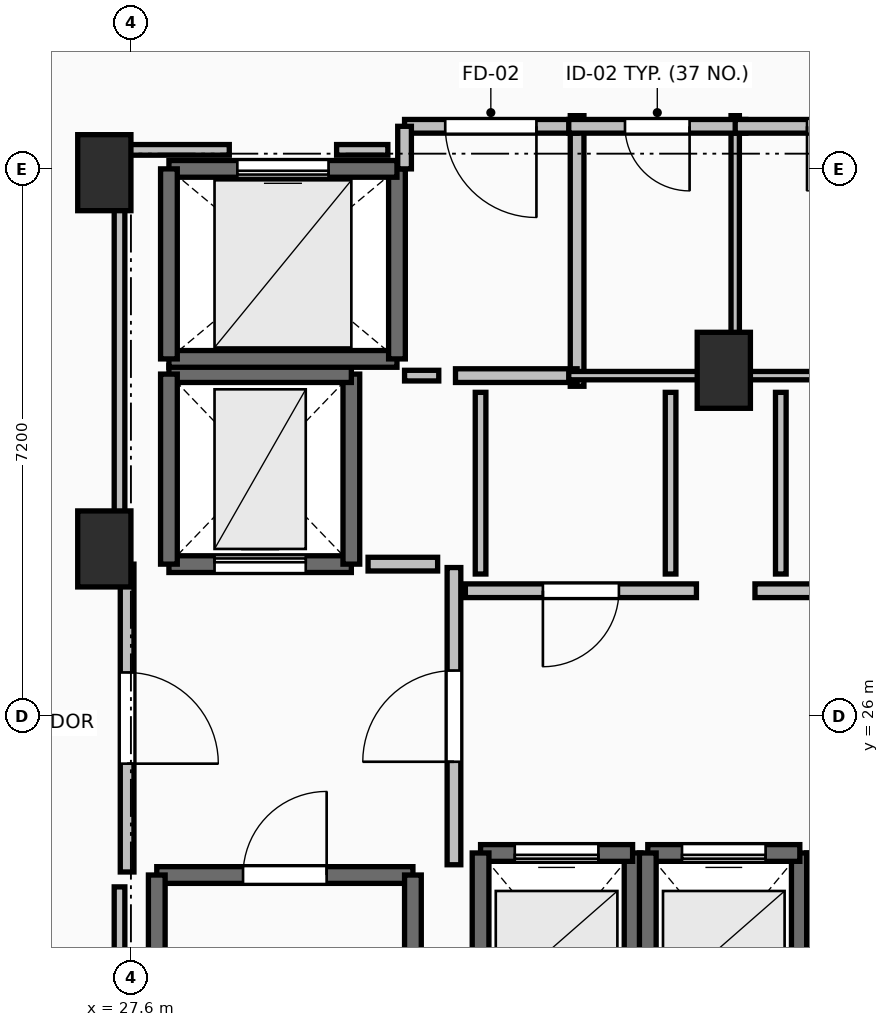
"""IFC4 building model, lengths in metres.
Left out: names, types, materials, properties, quantities, classifications, styles, units other than length and angle.
Written with IfcOpenShell. Run it as: python <this file> out.ifc"""

import sys

from ifc_helpers import new_model, si_unit, direction, frame, frame_2d, origin, origin_2d, place, context, subcontext, project, spatial, rectangle, extrude, element, fill, save


model = new_model("IFC4")
c1 = context("Model", 3, precision=1e-05, world=origin(), true_north=direction((0.0, 1.0)))
c2 = subcontext(c1, "Body", "Model", "MODEL_VIEW")
j1 = project(units=[si_unit("LENGTHUNIT", "METRE"), si_unit("PLANEANGLEUNIT", "RADIAN")], contexts=[c1])
p1 = place(None, origin())
s1 = spatial("IfcSite", under=j1, at=p1, CompositionType="ELEMENT")
p2 = place(p1, origin())
s2 = spatial("IfcBuilding", under=s1, at=p2, CompositionType="ELEMENT")
p3 = place(p2, frame((0.0, 0.0, 186.1)))
s3 = spatial("IfcBuildingStorey", under=s2, at=p3, CompositionType="ELEMENT", Elevation=186.1)
for number, where, z_axis, x_axis in (
    (1, (27.25, 28.2, 0.0), (0.0, 0.0, 1.0), (1.0, 0.0, 0.0)),
    (2, (27.25, 33.15, 0.0), (0.0, 0.0, 1.0), (1.0, 0.0, 0.0)),
    (3, (35.4, 30.55, 0.0), (0.0, 0.0, 1.0), (1.0, 0.0, 0.0)),
):
    element("IfcColumn", number, at=place(p3, frame(where, z_axis=z_axis, x_axis=x_axis)), inside=s3, PredefinedType="PILASTER", context=c2, shape_type="SweptSolid", body=[
        extrude(rectangle(XDim=0.7, YDim=1.0, at=origin_2d()), origin(), (0.0, 0.0, 1.0), 3.5),
    ])
p4 = place(p3, frame((27.94, 23.91, 0.0), z_axis=(0.0, 0.0, 1.0), x_axis=(1.0, 0.0, 0.0)))
e4 = element("IfcWall", 4, at=p4, inside=s3, PredefinedType="SOLIDWALL", context=c2, shape_type="SweptSolid", body=[
    extrude(rectangle(XDim=3.37, YDim=0.22, at=frame_2d((1.685, 0.0))), origin(), (0.0, 0.0, 1.0), 3.24),
])
p5 = place(p4, frame((1.135, 0.0, 0.0)))
e5 = element("IfcOpeningElement", 5, at=p5, cuts=e4, PredefinedType="OPENING", context=c2, shape_type="SweptSolid", body=[
    extrude(rectangle(XDim=1.1, YDim=2.15, at=frame_2d((0.55, 1.075))), frame((0.0, 0.125, 0.0), z_axis=(0.0, -1.0, 0.0), x_axis=(1.0, 0.0, 0.0)), (0.0, 0.0, 1.0), 0.25),
])
for number, where, z_axis, x_axis in (
    (6, (31.31, 23.91, 0.0), (0.0, 0.0, 1.0), (0.0, -1.0, 0.0)),
    (7, (27.94, 16.49, 0.0), (0.0, 0.0, 1.0), (0.0, 1.0, 0.0)),
):
    element("IfcWall", number, at=place(p3, frame(where, z_axis=z_axis, x_axis=x_axis)), inside=s3, PredefinedType="SOLIDWALL", context=c2, shape_type="SweptSolid", body=[
        extrude(rectangle(XDim=7.42, YDim=0.22, at=frame_2d((3.71, 0.0))), origin(), (0.0, 0.0, 1.0), 3.24),
    ])
p6 = place(p3, frame((34.2, 21.8, 0.0), z_axis=(0.0, 0.0, 1.0), x_axis=(0.0, 1.0, 0.0)))
e8 = element("IfcWall", 8, at=p6, inside=s3, PredefinedType="SOLIDWALL", context=c2, shape_type="SweptSolid", body=[
    extrude(rectangle(XDim=2.4, YDim=0.22, at=frame_2d((1.2, 0.0))), origin(), (0.0, 0.0, 1.0), 3.24),
])
p7 = place(p3, frame((34.2, 24.2, 0.0), z_axis=(0.0, 0.0, 1.0), x_axis=(-1.0, 0.0, 0.0)))
e9 = element("IfcWall", 9, at=p7, inside=s3, PredefinedType="SOLIDWALL", context=c2, shape_type="SweptSolid", body=[
    extrude(rectangle(XDim=2.0, YDim=0.22, at=frame_2d((1.0, 0.0))), origin(), (0.0, 0.0, 1.0), 3.24),
])
p8 = place(p7, frame((0.45, 0.0, 0.0)))
e10 = element("IfcOpeningElement", 10, at=p8, cuts=e9, PredefinedType="OPENING", context=c2, shape_type="SweptSolid", body=[
    extrude(rectangle(XDim=1.1, YDim=2.2, at=frame_2d((0.55, 1.1))), frame((0.0, 0.125, 0.0), z_axis=(0.0, -1.0, 0.0), x_axis=(1.0, 0.0, 0.0)), (0.0, 0.0, 1.0), 0.25),
])
for number, where, z_axis, x_axis in (
    (11, (32.2, 24.2, 0.0), (0.0, 0.0, 1.0), (0.0, -1.0, 0.0)),
    (12, (36.4, 21.8, 0.0), (0.0, 0.0, 1.0), (0.0, 1.0, 0.0)),
):
    element("IfcWall", number, at=place(p3, frame(where, z_axis=z_axis, x_axis=x_axis)), inside=s3, PredefinedType="SOLIDWALL", context=c2, shape_type="SweptSolid", body=[
        extrude(rectangle(XDim=2.4, YDim=0.22, at=frame_2d((1.2, 0.0))), origin(), (0.0, 0.0, 1.0), 3.24),
    ])
p9 = place(p3, frame((36.4, 24.2, 0.0), z_axis=(0.0, 0.0, 1.0), x_axis=(-1.0, 0.0, 0.0)))
e13 = element("IfcWall", 13, at=p9, inside=s3, PredefinedType="SOLIDWALL", context=c2, shape_type="SweptSolid", body=[
    extrude(rectangle(XDim=2.0, YDim=0.22, at=frame_2d((1.0, 0.0))), origin(), (0.0, 0.0, 1.0), 3.24),
])
p10 = place(p9, frame((0.45, 0.0, 0.0)))
e14 = element("IfcOpeningElement", 14, at=p10, cuts=e13, PredefinedType="OPENING", context=c2, shape_type="SweptSolid", body=[
    extrude(rectangle(XDim=1.1, YDim=2.2, at=frame_2d((0.55, 1.1))), frame((0.0, 0.125, 0.0), z_axis=(0.0, -1.0, 0.0), x_axis=(1.0, 0.0, 0.0)), (0.0, 0.0, 1.0), 0.25),
])
p11 = place(p3, frame((34.4, 24.2, 0.0), z_axis=(0.0, 0.0, 1.0), x_axis=(0.0, -1.0, 0.0)))
e15 = element("IfcWall", 15, at=p11, inside=s3, PredefinedType="SOLIDWALL", context=c2, shape_type="SweptSolid", body=[
    extrude(rectangle(XDim=2.4, YDim=0.22, at=frame_2d((1.2, 0.0))), origin(), (0.0, 0.0, 1.0), 3.24),
])
p12 = place(p3, frame((36.6, 24.2, 0.0), z_axis=(0.0, 0.0, 1.0), x_axis=(0.0, -1.0, 0.0)))
e16 = element("IfcWall", 16, at=p12, inside=s3, PredefinedType="SOLIDWALL", context=c2, shape_type="SweptSolid", body=[
    extrude(rectangle(XDim=2.6, YDim=0.22, at=frame_2d((1.3, 0.0))), origin(), (0.0, 0.0, 1.0), 3.24),
])
p13 = place(p3, frame((28.1, 28.0, 0.0), z_axis=(0.0, 0.0, 1.0), x_axis=(1.0, 0.0, 0.0)))
e17 = element("IfcWall", 17, at=p13, inside=s3, PredefinedType="SHEAR", context=c2, shape_type="SweptSolid", body=[
    extrude(rectangle(XDim=2.4, YDim=0.22, at=frame_2d((1.2, 0.0))), origin(), (0.0, 0.0, 1.0), 3.24),
])
p14 = place(p13, frame((0.6, 0.0, 0.0)))
e18 = element("IfcOpeningElement", 18, at=p14, cuts=e17, PredefinedType="OPENING", context=c2, shape_type="SweptSolid", body=[
    extrude(rectangle(XDim=1.2, YDim=2.2, at=frame_2d((0.6, 1.1))), frame((0.0, 0.125, 0.0), z_axis=(0.0, -1.0, 0.0), x_axis=(1.0, 0.0, 0.0)), (0.0, 0.0, 1.0), 0.25),
])
p15 = place(p3, frame((30.5, 28.0, 0.0), z_axis=(0.0, 0.0, 1.0), x_axis=(0.0, 1.0, 0.0)))
e19 = element("IfcWall", 19, at=p15, inside=s3, PredefinedType="SHEAR", context=c2, shape_type="SweptSolid", body=[
    extrude(rectangle(XDim=2.5, YDim=0.22, at=frame_2d((1.25, 0.0))), origin(), (0.0, 0.0, 1.0), 3.24),
])
p16 = place(p3, frame((30.5, 30.5, 0.0), z_axis=(0.0, 0.0, 1.0), x_axis=(-1.0, 0.0, 0.0)))
e20 = element("IfcWall", 20, at=p16, inside=s3, PredefinedType="SHEAR", context=c2, shape_type="SweptSolid", body=[
    extrude(rectangle(XDim=2.4, YDim=0.22, at=frame_2d((1.2, 0.0))), origin(), (0.0, 0.0, 1.0), 3.24),
])
p17 = place(p3, frame((28.1, 30.5, 0.0), z_axis=(0.0, 0.0, 1.0), x_axis=(0.0, -1.0, 0.0)))
e21 = element("IfcWall", 21, at=p17, inside=s3, PredefinedType="SHEAR", context=c2, shape_type="SweptSolid", body=[
    extrude(rectangle(XDim=2.5, YDim=0.22, at=frame_2d((1.25, 0.0))), origin(), (0.0, 0.0, 1.0), 3.24),
])
p18 = place(p3, frame((28.1, 30.7, 0.0), z_axis=(0.0, 0.0, 1.0), x_axis=(1.0, 0.0, 0.0)))
e22 = element("IfcWall", 22, at=p18, inside=s3, PredefinedType="SOLIDWALL", context=c2, shape_type="SweptSolid", body=[
    extrude(rectangle(XDim=3.0, YDim=0.22, at=frame_2d((1.5, 0.0))), origin(), (0.0, 0.0, 1.0), 3.24),
])
p19 = place(p3, frame((31.1, 30.7, 0.0), z_axis=(0.0, 0.0, 1.0), x_axis=(0.0, 1.0, 0.0)))
e23 = element("IfcWall", 23, at=p19, inside=s3, PredefinedType="SOLIDWALL", context=c2, shape_type="SweptSolid", body=[
    extrude(rectangle(XDim=2.5, YDim=0.22, at=frame_2d((1.25, 0.0))), origin(), (0.0, 0.0, 1.0), 3.24),
])
p20 = place(p3, frame((31.1, 33.2, 0.0), z_axis=(0.0, 0.0, 1.0), x_axis=(-1.0, 0.0, 0.0)))
e24 = element("IfcWall", 24, at=p20, inside=s3, PredefinedType="SOLIDWALL", context=c2, shape_type="SweptSolid", body=[
    extrude(rectangle(XDim=3.0, YDim=0.22, at=frame_2d((1.5, 0.0))), origin(), (0.0, 0.0, 1.0), 3.24),
])
p21 = place(p20, frame((0.9, 0.0, 0.0)))
e25 = element("IfcOpeningElement", 25, at=p21, cuts=e24, PredefinedType="OPENING", context=c2, shape_type="SweptSolid", body=[
    extrude(rectangle(XDim=1.2, YDim=2.2, at=frame_2d((0.6, 1.1))), frame((0.0, 0.125, 0.0), z_axis=(0.0, -1.0, 0.0), x_axis=(1.0, 0.0, 0.0)), (0.0, 0.0, 1.0), 0.25),
])
p22 = place(p3, frame((28.1, 33.2, 0.0), z_axis=(0.0, 0.0, 1.0), x_axis=(0.0, -1.0, 0.0)))
e26 = element("IfcWall", 26, at=p22, inside=s3, PredefinedType="SOLIDWALL", context=c2, shape_type="SweptSolid", body=[
    extrude(rectangle(XDim=2.5, YDim=0.22, at=frame_2d((1.25, 0.0))), origin(), (0.0, 0.0, 1.0), 3.24),
])
p23 = place(p3, frame((31.85, 24.045, 0.0), z_axis=(0.0, 0.0, 1.0), x_axis=(0.0, 1.0, 0.0)))
e27 = element("IfcWall", 27, at=p23, inside=s3, PredefinedType="PARTITIONING", context=c2, shape_type="SweptSolid", body=[
    extrude(rectangle(XDim=3.91, YDim=0.18, at=frame_2d((1.955, 0.0))), origin(), (0.0, 0.0, 1.0), 3.24),
])
p24 = place(p23, frame((1.355, 0.0, 0.0)))
e28 = element("IfcOpeningElement", 28, at=p24, cuts=e27, PredefinedType="OPENING", context=c2, shape_type="SweptSolid", body=[
    extrude(rectangle(XDim=1.2, YDim=2.15, at=frame_2d((0.6, 1.075))), frame((0.0, 0.105, 0.0), z_axis=(0.0, -1.0, 0.0), x_axis=(1.0, 0.0, 0.0)), (0.0, 0.0, 1.0), 0.21),
])
p25 = place(p3, frame((27.55, 28.0, 0.0), z_axis=(0.0, 0.0, 1.0), x_axis=(0.0, -1.0, 0.0)))
e29 = element("IfcWall", 29, at=p25, inside=s3, PredefinedType="PARTITIONING", context=c2, shape_type="SweptSolid", body=[
    extrude(rectangle(XDim=4.05, YDim=0.18, at=frame_2d((2.025, 0.0))), origin(), (0.0, 0.0, 1.0), 3.24),
])
p26 = place(p25, frame((1.425, 0.0, 0.0)))
e30 = element("IfcOpeningElement", 30, at=p26, cuts=e29, PredefinedType="OPENING", context=c2, shape_type="SweptSolid", body=[
    extrude(rectangle(XDim=1.2, YDim=2.15, at=frame_2d((0.6, 1.075))), frame((0.0, 0.105, 0.0), z_axis=(0.0, -1.0, 0.0), x_axis=(1.0, 0.0, 0.0)), (0.0, 0.0, 1.0), 0.21),
])
p27 = place(p3, frame((33.47, 30.34, 0.0), z_axis=(0.0, 0.0, 1.0), x_axis=(0.0, 1.0, 0.0)))
e31 = element("IfcWall", 31, at=p27, inside=s3, PredefinedType="PARTITIONING", context=c2, shape_type="SweptSolid", body=[
    extrude(rectangle(XDim=3.56, YDim=0.18, at=frame_2d((1.78, 0.0))), origin(), (0.0, 0.0, 1.0), 3.24),
])
p28 = place(p3, frame((31.87, 30.48, 0.0), z_axis=(0.0, 0.0, 1.0), x_axis=(1.0, 0.0, 0.0)))
e32 = element("IfcWall", 32, at=p28, inside=s3, PredefinedType="PARTITIONING", context=c2, shape_type="SweptSolid", body=[
    extrude(rectangle(XDim=1.6, YDim=0.18, at=frame_2d((0.8, 0.0))), origin(), (0.0, 0.0, 1.0), 3.24),
])
p29 = place(p3, frame((33.47, 33.76, 0.0), z_axis=(0.0, 0.0, 1.0), x_axis=(-1.0, 0.0, 0.0)))
e33 = element("IfcWall", 33, at=p29, inside=s3, PredefinedType="PARTITIONING", context=c2, shape_type="SweptSolid", body=[
    extrude(rectangle(XDim=2.27, YDim=0.18, at=frame_2d((1.135, 0.0))), origin(), (0.0, 0.0, 1.0), 3.24),
])
p30 = place(p29, frame((0.535, 0.0, 0.0)))
e34 = element("IfcOpeningElement", 34, at=p30, cuts=e33, PredefinedType="OPENING", context=c2, shape_type="SweptSolid", body=[
    extrude(rectangle(XDim=1.2, YDim=2.15, at=frame_2d((0.6, 1.075))), frame((0.0, 0.105, 0.0), z_axis=(0.0, -1.0, 0.0), x_axis=(1.0, 0.0, 0.0)), (0.0, 0.0, 1.0), 0.21),
])
p31 = place(p3, frame((31.2, 33.76, 0.0), z_axis=(0.0, 0.0, 1.0), x_axis=(0.0, -1.0, 0.0)))
e35 = element("IfcWall", 35, at=p31, inside=s3, PredefinedType="PARTITIONING", context=c2, shape_type="SweptSolid", body=[
    extrude(rectangle(XDim=0.56, YDim=0.18, at=frame_2d((0.28, 0.0))), origin(), (0.0, 0.0, 1.0), 3.24),
])
p32 = place(p3, frame((35.04, 27.65, 0.0), z_axis=(0.0, 0.0, 1.0), x_axis=(-1.0, 0.0, 0.0)))
e36 = element("IfcWall", 36, at=p32, inside=s3, PredefinedType="PARTITIONING", context=c2, shape_type="SweptSolid", body=[
    extrude(rectangle(XDim=3.04, YDim=0.18, at=frame_2d((1.52, 0.0))), origin(), (0.0, 0.0, 1.0), 3.24),
])
p33 = place(p32, frame((1.02, 0.0, 0.0)))
e37 = element("IfcOpeningElement", 37, at=p33, cuts=e36, PredefinedType="OPENING", context=c2, shape_type="SweptSolid", body=[
    extrude(rectangle(XDim=1.0, YDim=2.15, at=frame_2d((0.5, 1.075))), frame((0.0, 0.105, 0.0), z_axis=(0.0, -1.0, 0.0), x_axis=(1.0, 0.0, 0.0)), (0.0, 0.0, 1.0), 0.21),
])
p34 = place(p3, frame((39.19, 27.65, 0.0), z_axis=(0.0, 0.0, 1.0), x_axis=(-1.0, 0.0, 0.0)))
e38 = element("IfcWall", 38, at=p34, inside=s3, PredefinedType="PARTITIONING", context=c2, shape_type="SweptSolid", body=[
    extrude(rectangle(XDim=3.38, YDim=0.18, at=frame_2d((1.69, 0.0))), origin(), (0.0, 0.0, 1.0), 3.24),
])
p35 = place(p34, frame((1.265, 0.0, 0.0)))
e39 = element("IfcOpeningElement", 39, at=p35, cuts=e38, PredefinedType="OPENING", context=c2, shape_type="SweptSolid", body=[
    extrude(rectangle(XDim=0.85, YDim=2.1, at=frame_2d((0.425, 1.05))), frame((0.0, 0.105, 0.0), z_axis=(0.0, -1.0, 0.0), x_axis=(1.0, 0.0, 0.0)), (0.0, 0.0, 1.0), 0.21),
])
p36 = place(p3, frame((35.55, 30.34, 0.0), z_axis=(0.0, 0.0, 1.0), x_axis=(0.0, 1.0, 0.0)))
e40 = element("IfcWall", 40, at=p36, inside=s3, PredefinedType="PARTITIONING", context=c2, shape_type="SweptSolid", body=[
    extrude(rectangle(XDim=3.56, YDim=0.11, at=frame_2d((1.78, 0.0))), origin(), (0.0, 0.0, 1.0), 2.432),
])
p37 = place(p3, frame((33.36, 30.48, 0.0), z_axis=(0.0, 0.0, 1.0), x_axis=(1.0, 0.0, 0.0)))
e41 = element("IfcWall", 41, at=p37, inside=s3, PredefinedType="PARTITIONING", context=c2, shape_type="SweptSolid", body=[
    extrude(rectangle(XDim=1.81, YDim=0.11, at=frame_2d((0.905, 0.0))), origin(), (0.0, 0.0, 1.0), 3.24),
])
p38 = place(p3, frame((35.69, 33.76, 0.0), z_axis=(0.0, 0.0, 1.0), x_axis=(-1.0, 0.0, 0.0)))
e42 = element("IfcWall", 42, at=p38, inside=s3, PredefinedType="PARTITIONING", context=c2, shape_type="SweptSolid", body=[
    extrude(rectangle(XDim=2.33, YDim=0.18, at=frame_2d((1.165, 0.0))), origin(), (0.0, 0.0, 1.0), 3.24),
])
p39 = place(p38, frame((0.74, 0.0, 0.0)))
e43 = element("IfcOpeningElement", 43, at=p39, cuts=e42, PredefinedType="OPENING", context=c2, shape_type="SweptSolid", body=[
    extrude(rectangle(XDim=0.85, YDim=2.1, at=frame_2d((0.425, 1.05))), frame((0.0, 0.105, 0.0), z_axis=(0.0, -1.0, 0.0), x_axis=(1.0, 0.0, 0.0)), (0.0, 0.0, 1.0), 0.21),
])
p40 = place(p3, frame((35.68, 30.48, 0.0), z_axis=(0.0, 0.0, 1.0), x_axis=(1.0, 0.0, 0.0)))
e44 = element("IfcWall", 44, at=p40, inside=s3, PredefinedType="PARTITIONING", context=c2, shape_type="SweptSolid", body=[
    extrude(rectangle(XDim=2.595, YDim=0.11, at=frame_2d((1.297, 0.0))), origin(), (0.0, 0.0, 1.0), 2.432),
])
p41 = place(p3, frame((38.29, 33.76, 0.0), z_axis=(0.0, 0.0, 1.0), x_axis=(-1.0, 0.0, 0.0)))
e45 = element("IfcWall", 45, at=p41, inside=s3, PredefinedType="PARTITIONING", context=c2, shape_type="SweptSolid", body=[
    extrude(rectangle(XDim=2.74, YDim=0.18, at=frame_2d((1.37, 0.0))), origin(), (0.0, 0.0, 1.0), 3.24),
])
p42 = place(p41, frame((0.945, 0.0, 0.0)))
e46 = element("IfcOpeningElement", 46, at=p42, cuts=e45, PredefinedType="OPENING", context=c2, shape_type="SweptSolid", body=[
    extrude(rectangle(XDim=0.85, YDim=2.1, at=frame_2d((0.425, 1.05))), frame((0.0, 0.105, 0.0), z_axis=(0.0, -1.0, 0.0), x_axis=(1.0, 0.0, 0.0)), (0.0, 0.0, 1.0), 0.21),
])
p43 = place(p3, frame((31.635, 28.0, 0.0), z_axis=(0.0, 0.0, 1.0), x_axis=(-1.0, 0.0, 0.0)))
e47 = element("IfcWall", 47, at=p43, inside=s3, PredefinedType="PARTITIONING", context=c2, shape_type="SweptSolid", body=[
    extrude(rectangle(XDim=0.915, YDim=0.18, at=frame_2d((0.458, 0.0))), origin(), (0.0, 0.0, 1.0), 3.24),
])
p44 = place(p3, frame((31.2, 30.48, 0.0), z_axis=(0.0, 0.0, 1.0), x_axis=(1.0, 0.0, 0.0)))
e48 = element("IfcWall", 48, at=p44, inside=s3, PredefinedType="PARTITIONING", context=c2, shape_type="SweptSolid", body=[
    extrude(rectangle(XDim=0.45, YDim=0.14, at=frame_2d((0.225, 0.0))), origin(), (0.0, 0.0, 1.0), 3.24),
])
for number, where, z_axis, x_axis in (
    (49, (32.2, 30.26, 0.0), (0.0, 0.0, 1.0), (0.0, -1.0, 0.0)),
    (50, (34.7, 27.87, 0.0), (0.0, 0.0, 1.0), (0.0, 1.0, 0.0)),
    (51, (36.15, 30.26, 0.0), (0.0, 0.0, 1.0), (0.0, -1.0, 0.0)),
):
    element("IfcWall", number, at=place(p3, frame(where, z_axis=z_axis, x_axis=x_axis)), inside=s3, PredefinedType="PARTITIONING", context=c2, shape_type="SweptSolid", body=[
        extrude(rectangle(XDim=2.39, YDim=0.14, at=frame_2d((1.195, 0.0))), origin(), (0.0, 0.0, 1.0), 3.24),
    ])
p45 = place(p3, frame((30.98, 33.45, 0.0), z_axis=(0.0, 0.0, 1.0), x_axis=(-1.0, 0.0, 0.0)))
e52 = element("IfcWall", 52, at=p45, inside=s3, PredefinedType="PARTITIONING", context=c2, shape_type="SweptSolid", body=[
    extrude(rectangle(XDim=0.674, YDim=0.14, at=frame_2d((0.337, 0.0))), origin(), (0.0, 0.0, 1.0), 3.24),
])
p46 = place(p3, frame((28.894, 33.45, 0.0), z_axis=(0.0, 0.0, 1.0), x_axis=(-1.0, 0.0, 0.0)))
e53 = element("IfcWall", 53, at=p46, inside=s3, PredefinedType="PARTITIONING", context=c2, shape_type="SweptSolid", body=[
    extrude(rectangle(XDim=1.444, YDim=0.14, at=frame_2d((0.722, 0.0))), origin(), (0.0, 0.0, 1.0), 2.432),
])
p47 = place(p3, frame((27.45, 33.45, 0.0), z_axis=(0.0, 0.0, 1.0), x_axis=(0.0, -1.0, 0.0)))
e54 = element("IfcWall", 54, at=p47, inside=s3, PredefinedType="PARTITIONING", context=c2, shape_type="SweptSolid", body=[
    extrude(rectangle(XDim=5.254, YDim=0.14, at=frame_2d((2.627, 0.0))), origin(), (0.0, 0.0, 1.0), 2.432),
])
p48 = place(p3, frame((27.45, 23.754, 0.0), z_axis=(0.0, 0.0, 1.0), x_axis=(0.0, -1.0, 0.0)))
e55 = element("IfcWall", 55, at=p48, inside=s3, PredefinedType="PARTITIONING", context=c2, shape_type="SweptSolid", body=[
    extrude(rectangle(XDim=7.514, YDim=0.14, at=frame_2d((3.757, 0.0))), origin(), (0.0, 0.0, 1.0), 2.432),
])
p49 = place(p5, origin())
e56 = element("IfcDoor", 56, at=p49, inside=s3, OperationType="SINGLE_SWING_RIGHT", PredefinedType="DOOR", context=c2, shape_type="SweptSolid", body=[
    extrude(rectangle(XDim=1.1, YDim=2.15, at=frame_2d((0.55, 1.075))), frame((0.0, 0.025, 0.0), z_axis=(0.0, -1.0, 0.0), x_axis=(1.0, 0.0, 0.0)), (0.0, 0.0, 1.0), 0.05),
])
fill(e5, e56)
p50 = place(p8, origin())
e57 = element("IfcDoor", 57, at=p50, inside=s3, OperationType="SLIDING_TO_LEFT", PredefinedType="DOOR", context=c2, shape_type="SweptSolid", body=[
    extrude(rectangle(XDim=1.1, YDim=2.2, at=frame_2d((0.55, 1.1))), frame((0.0, 0.025, 0.0), z_axis=(0.0, -1.0, 0.0), x_axis=(1.0, 0.0, 0.0)), (0.0, 0.0, 1.0), 0.05),
])
fill(e10, e57)
p51 = place(p10, origin())
e58 = element("IfcDoor", 58, at=p51, inside=s3, OperationType="SLIDING_TO_LEFT", PredefinedType="DOOR", context=c2, shape_type="SweptSolid", body=[
    extrude(rectangle(XDim=1.1, YDim=2.2, at=frame_2d((0.55, 1.1))), frame((0.0, 0.025, 0.0), z_axis=(0.0, -1.0, 0.0), x_axis=(1.0, 0.0, 0.0)), (0.0, 0.0, 1.0), 0.05),
])
fill(e14, e58)
p52 = place(p14, origin())
e59 = element("IfcDoor", 59, at=p52, inside=s3, OperationType="SLIDING_TO_LEFT", PredefinedType="DOOR", context=c2, shape_type="SweptSolid", body=[
    extrude(rectangle(XDim=1.2, YDim=2.2, at=frame_2d((0.6, 1.1))), frame((0.0, 0.025, 0.0), z_axis=(0.0, -1.0, 0.0), x_axis=(1.0, 0.0, 0.0)), (0.0, 0.0, 1.0), 0.05),
])
fill(e18, e59)
p53 = place(p21, origin())
e60 = element("IfcDoor", 60, at=p53, inside=s3, OperationType="SLIDING_TO_LEFT", PredefinedType="DOOR", context=c2, shape_type="SweptSolid", body=[
    extrude(rectangle(XDim=1.2, YDim=2.2, at=frame_2d((0.6, 1.1))), frame((0.0, 0.025, 0.0), z_axis=(0.0, -1.0, 0.0), x_axis=(1.0, 0.0, 0.0)), (0.0, 0.0, 1.0), 0.05),
])
fill(e25, e60)
p54 = place(p24, origin())
e61 = element("IfcDoor", 61, at=p54, inside=s3, OperationType="SINGLE_SWING_LEFT", PredefinedType="DOOR", context=c2, shape_type="SweptSolid", body=[
    extrude(rectangle(XDim=1.2, YDim=2.15, at=frame_2d((0.6, 1.075))), frame((0.0, 0.025, 0.0), z_axis=(0.0, -1.0, 0.0), x_axis=(1.0, 0.0, 0.0)), (0.0, 0.0, 1.0), 0.05),
])
fill(e28, e61)
p55 = place(p26, origin())
e62 = element("IfcDoor", 62, at=p55, inside=s3, OperationType="SINGLE_SWING_RIGHT", PredefinedType="DOOR", context=c2, shape_type="SweptSolid", body=[
    extrude(rectangle(XDim=1.2, YDim=2.15, at=frame_2d((0.6, 1.075))), frame((0.0, 0.025, 0.0), z_axis=(0.0, -1.0, 0.0), x_axis=(1.0, 0.0, 0.0)), (0.0, 0.0, 1.0), 0.05),
])
fill(e30, e62)
p56 = place(p30, origin())
e63 = element("IfcDoor", 63, at=p56, inside=s3, OperationType="SINGLE_SWING_LEFT", PredefinedType="DOOR", context=c2, shape_type="SweptSolid", body=[
    extrude(rectangle(XDim=1.2, YDim=2.15, at=frame_2d((0.6, 1.075))), frame((0.0, 0.025, 0.0), z_axis=(0.0, -1.0, 0.0), x_axis=(1.0, 0.0, 0.0)), (0.0, 0.0, 1.0), 0.05),
])
fill(e34, e63)
p57 = place(p33, origin())
e64 = element("IfcDoor", 64, at=p57, inside=s3, OperationType="SINGLE_SWING_RIGHT", PredefinedType="DOOR", context=c2, shape_type="SweptSolid", body=[
    extrude(rectangle(XDim=1.0, YDim=2.15, at=frame_2d((0.5, 1.075))), frame((0.0, 0.025, 0.0), z_axis=(0.0, -1.0, 0.0), x_axis=(1.0, 0.0, 0.0)), (0.0, 0.0, 1.0), 0.05),
])
fill(e37, e64)
p58 = place(p39, origin())
e65 = element("IfcDoor", 65, at=p58, inside=s3, OperationType="SINGLE_SWING_LEFT", PredefinedType="DOOR", context=c2, shape_type="SweptSolid", body=[
    extrude(rectangle(XDim=0.85, YDim=2.1, at=frame_2d((0.425, 1.05))), frame((0.0, 0.025, 0.0), z_axis=(0.0, -1.0, 0.0), x_axis=(1.0, 0.0, 0.0)), (0.0, 0.0, 1.0), 0.05),
])
fill(e43, e65)
p59 = place(p42, origin())
e66 = element("IfcDoor", 66, at=p59, inside=s3, OperationType="SINGLE_SWING_RIGHT", PredefinedType="DOOR", context=c2, shape_type="SweptSolid", body=[
    extrude(rectangle(XDim=0.85, YDim=2.1, at=frame_2d((0.425, 1.05))), frame((0.0, 0.025, 0.0), z_axis=(0.0, -1.0, 0.0), x_axis=(1.0, 0.0, 0.0)), (0.0, 0.0, 1.0), 0.05),
])
fill(e46, e66)
save(model, sys.argv[1])
